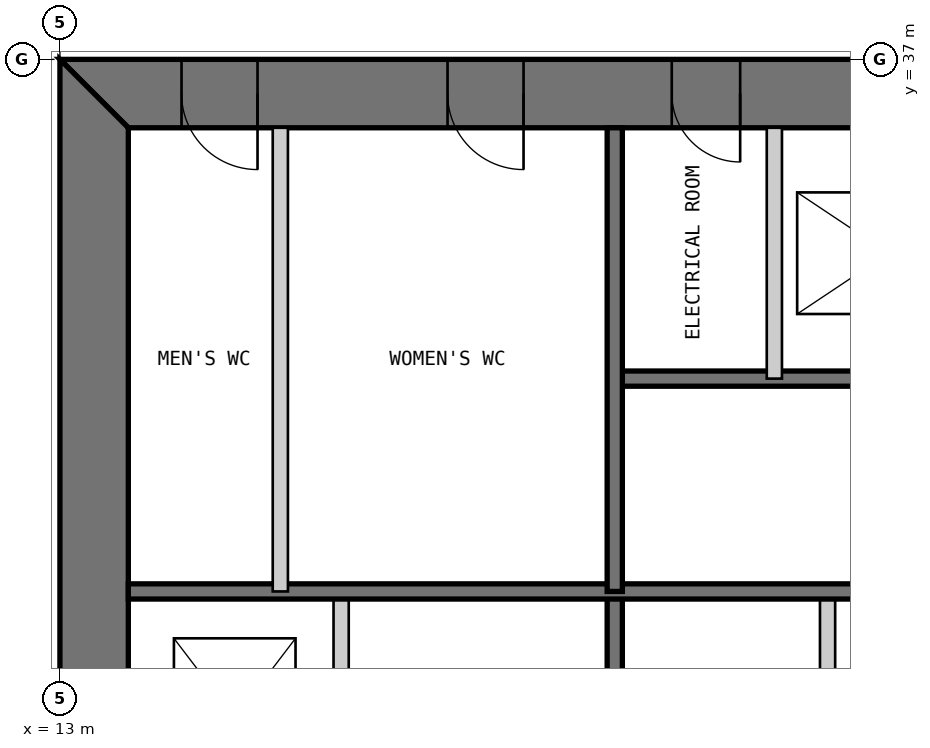
"""IFC4 building model, lengths in metres.
Left out: names, types, materials, properties, quantities, classifications, styles, units other than length and angle.
Written with IfcOpenShell. Run it as: python <this file> out.ifc"""

import sys

from ifc_helpers import new_model, si_unit, direction, frame, frame_2d, origin, place, context, subcontext, project, spatial, polyline, rectangle, outline, extrude, element, fill, save


model = new_model("IFC4")
c1 = context("Model", 3, precision=1e-05, world=origin(), true_north=direction((0.0, 1.0)))
c2 = subcontext(c1, "Body", "Model", "MODEL_VIEW")
j1 = project(units=[si_unit("LENGTHUNIT", "METRE"), si_unit("PLANEANGLEUNIT", "RADIAN")], contexts=[c1])
p1 = place(None, origin())
s1 = spatial("IfcSite", under=j1, at=p1, CompositionType="ELEMENT")
p2 = place(p1, origin())
s2 = spatial("IfcBuilding", under=s1, at=p2, CompositionType="ELEMENT")
p3 = place(p2, frame((0.0, 0.0, 83.0)))
s3 = spatial("IfcBuildingStorey", under=s2, at=p3, CompositionType="ELEMENT", Elevation=83.0)
p4 = place(p3, frame((37.0, 36.55, 0.0), z_axis=(0.0, 0.0, 1.0), x_axis=(-1.0, 0.0, 0.0)))
e1 = element("IfcWall", 1, at=p4, inside=s3, PredefinedType="SHEAR", context=c2, shape_type="SweptSolid", body=[
    extrude(outline(polyline([(0.0, -0.45), (24.0, -0.45), (23.1, 0.45), (0.9, 0.45), (0.0, -0.45)])), origin(), (0.0, 0.0, 1.0), 4.0),
])
p5 = place(p4, frame((4.9, 0.0, 0.0)))
e2 = element("IfcOpeningElement", 2, at=p5, cuts=e1, PredefinedType="OPENING", context=c2, shape_type="SweptSolid", body=[
    extrude(rectangle(XDim=1.0, YDim=2.2, at=frame_2d((0.5, 1.1))), frame((0.0, 0.46, 0.0), z_axis=(0.0, -1.0, 0.0), x_axis=(1.0, 0.0, 0.0)), (0.0, 0.0, 1.0), 0.92),
])
p6 = place(p4, frame((8.9, 0.0, 0.0)))
e3 = element("IfcOpeningElement", 3, at=p6, cuts=e1, PredefinedType="OPENING", context=c2, shape_type="SweptSolid", body=[
    extrude(rectangle(XDim=1.1, YDim=2.2, at=frame_2d((0.55, 1.1))), frame((0.0, 0.46, 0.0), z_axis=(0.0, -1.0, 0.0), x_axis=(1.0, 0.0, 0.0)), (0.0, 0.0, 1.0), 0.92),
])
p7 = place(p4, frame((15.05, 0.0, 0.0)))
e4 = element("IfcOpeningElement", 4, at=p7, cuts=e1, PredefinedType="OPENING", context=c2, shape_type="SweptSolid", body=[
    extrude(rectangle(XDim=0.9, YDim=2.2, at=frame_2d((0.45, 1.1))), frame((0.0, 0.46, 0.0), z_axis=(0.0, -1.0, 0.0), x_axis=(1.0, 0.0, 0.0)), (0.0, 0.0, 1.0), 0.92),
])
p8 = place(p4, frame((17.9, 0.0, 0.0)))
e5 = element("IfcOpeningElement", 5, at=p8, cuts=e1, PredefinedType="OPENING", context=c2, shape_type="SweptSolid", body=[
    extrude(rectangle(XDim=1.0, YDim=2.2, at=frame_2d((0.5, 1.1))), frame((0.0, 0.46, 0.0), z_axis=(0.0, -1.0, 0.0), x_axis=(1.0, 0.0, 0.0)), (0.0, 0.0, 1.0), 0.92),
])
p9 = place(p4, frame((21.4, 0.0, 0.0)))
e6 = element("IfcOpeningElement", 6, at=p9, cuts=e1, PredefinedType="OPENING", context=c2, shape_type="SweptSolid", body=[
    extrude(rectangle(XDim=1.0, YDim=2.2, at=frame_2d((0.5, 1.1))), frame((0.0, 0.46, 0.0), z_axis=(0.0, -1.0, 0.0), x_axis=(1.0, 0.0, 0.0)), (0.0, 0.0, 1.0), 0.92),
])
p10 = place(p3, frame((13.45, 36.1, 0.0), z_axis=(0.0, 0.0, 1.0), x_axis=(0.0, -1.0, 0.0)))
e7 = element("IfcWall", 7, at=p10, inside=s3, PredefinedType="SHEAR", context=c2, shape_type="SweptSolid", body=[
    extrude(outline(polyline([(-0.9, -0.45), (23.1, -0.45), (22.2, 0.45), (0.0, 0.45), (-0.9, -0.45)])), origin(), (0.0, 0.0, 1.0), 4.0),
])
p11 = place(p10, frame((20.2, 0.0, 0.0)))
e8 = element("IfcOpeningElement", 8, at=p11, cuts=e7, PredefinedType="OPENING", context=c2, shape_type="SweptSolid", body=[
    extrude(rectangle(XDim=1.0, YDim=2.2, at=frame_2d((0.5, 1.1))), frame((0.0, 0.46, 0.0), z_axis=(0.0, -1.0, 0.0), x_axis=(1.0, 0.0, 0.0)), (0.0, 0.0, 1.0), 0.92),
])
p12 = place(p10, frame((17.25, 0.0, 0.0)))
e9 = element("IfcOpeningElement", 9, at=p12, cuts=e7, PredefinedType="OPENING", context=c2, shape_type="SweptSolid", body=[
    extrude(rectangle(XDim=0.9, YDim=2.2, at=frame_2d((0.45, 1.1))), frame((0.0, 0.46, 0.0), z_axis=(0.0, -1.0, 0.0), x_axis=(1.0, 0.0, 0.0)), (0.0, 0.0, 1.0), 0.92),
])
p13 = place(p3, frame((16.7, 13.9, 0.0), z_axis=(0.0, 0.0, 1.0), x_axis=(0.0, 1.0, 0.0)))
e10 = element("IfcWall", 10, at=p13, inside=s3, PredefinedType="PARTITIONING", context=c2, shape_type="SweptSolid", body=[
    extrude(rectangle(XDim=16.1, YDim=0.2, at=frame_2d((8.05, 0.0))), origin(), (0.0, 0.0, 1.0), 3.8),
])
p14 = place(p13, frame((4.1, 0.0, 0.0)))
e11 = element("IfcOpeningElement", 11, at=p14, cuts=e10, PredefinedType="OPENING", context=c2, shape_type="SweptSolid", body=[
    extrude(rectangle(XDim=0.9, YDim=2.2, at=frame_2d((0.45, 1.1))), frame((0.0, 0.11, 0.0), z_axis=(0.0, -1.0, 0.0), x_axis=(1.0, 0.0, 0.0)), (0.0, 0.0, 1.0), 0.22),
])
p15 = place(p13, frame((7.217, 0.0, 0.0)))
e12 = element("IfcOpeningElement", 12, at=p15, cuts=e10, PredefinedType="OPENING", context=c2, shape_type="SweptSolid", body=[
    extrude(rectangle(XDim=1.1, YDim=2.2, at=frame_2d((0.55, 1.1))), frame((0.0, 0.11, 0.0), z_axis=(0.0, -1.0, 0.0), x_axis=(1.0, 0.0, 0.0)), (0.0, 0.0, 1.0), 0.22),
])
p16 = place(p13, frame((10.55, 0.0, 0.0)))
e13 = element("IfcOpeningElement", 13, at=p16, cuts=e10, PredefinedType="OPENING", context=c2, shape_type="SweptSolid", body=[
    extrude(rectangle(XDim=1.1, YDim=2.2, at=frame_2d((0.55, 1.1))), frame((0.0, 0.11, 0.0), z_axis=(0.0, -1.0, 0.0), x_axis=(1.0, 0.0, 0.0)), (0.0, 0.0, 1.0), 0.22),
])
p17 = place(p13, frame((13.883, 0.0, 0.0)))
e14 = element("IfcOpeningElement", 14, at=p17, cuts=e10, PredefinedType="OPENING", context=c2, shape_type="SweptSolid", body=[
    extrude(rectangle(XDim=1.1, YDim=2.2, at=frame_2d((0.55, 1.1))), frame((0.0, 0.11, 0.0), z_axis=(0.0, -1.0, 0.0), x_axis=(1.0, 0.0, 0.0)), (0.0, 0.0, 1.0), 0.22),
])
p18 = place(p3, frame((20.3, 13.9, 0.0), z_axis=(0.0, 0.0, 1.0), x_axis=(0.0, 1.0, 0.0)))
e15 = element("IfcWall", 15, at=p18, inside=s3, PredefinedType="SOLIDWALL", context=c2, shape_type="SweptSolid", body=[
    extrude(rectangle(XDim=16.1, YDim=0.2, at=frame_2d((8.05, 0.0))), origin(), (0.0, 0.0, 1.0), 3.8),
])
p19 = place(p3, frame((23.1, 20.0, 0.0), z_axis=(0.0, 0.0, 1.0), x_axis=(0.0, 1.0, 0.0)))
e16 = element("IfcWall", 16, at=p19, inside=s3, PredefinedType="PARTITIONING", context=c2, shape_type="SweptSolid", body=[
    extrude(rectangle(XDim=10.0, YDim=0.2, at=frame_2d((5.0, 0.0))), origin(), (0.0, 0.0, 1.0), 3.8),
])
p20 = place(p3, frame((29.7, 32.8, 0.0), z_axis=(0.0, 0.0, 1.0), x_axis=(-1.0, 0.0, 0.0)))
e17 = element("IfcWall", 17, at=p20, inside=s3, PredefinedType="SOLIDWALL", context=c2, shape_type="SweptSolid", body=[
    extrude(rectangle(XDim=9.4, YDim=0.2, at=frame_2d((4.7, 0.0))), origin(), (0.0, 0.0, 1.0), 3.8),
])
p21 = place(p20, frame((0.25, 0.0, 0.0)))
e18 = element("IfcOpeningElement", 18, at=p21, cuts=e17, PredefinedType="OPENING", context=c2, shape_type="SweptSolid", body=[
    extrude(rectangle(XDim=1.0, YDim=2.2, at=frame_2d((0.5, 1.1))), frame((0.0, 0.11, 0.0), z_axis=(0.0, -1.0, 0.0), x_axis=(1.0, 0.0, 0.0)), (0.0, 0.0, 1.0), 0.22),
])
p22 = place(p3, frame((29.7, 30.0, 0.0), z_axis=(0.0, 0.0, 1.0), x_axis=(-1.0, 0.0, 0.0)))
e19 = element("IfcWall", 19, at=p22, inside=s3, PredefinedType="SOLIDWALL", context=c2, shape_type="SweptSolid", body=[
    extrude(rectangle(XDim=15.8, YDim=0.2, at=frame_2d((7.9, 0.0))), origin(), (0.0, 0.0, 1.0), 3.8),
])
p23 = place(p3, frame((22.4, 36.1, 0.0), z_axis=(0.0, 0.0, 1.0), x_axis=(0.0, -1.0, 0.0)))
e20 = element("IfcWall", 20, at=p23, inside=s3, PredefinedType="PARTITIONING", context=c2, shape_type="SweptSolid", body=[
    extrude(rectangle(XDim=3.3, YDim=0.2, at=frame_2d((1.65, 0.0))), origin(), (0.0, 0.0, 1.0), 3.8),
])
p24 = place(p3, frame((20.3, 36.1, 0.0), z_axis=(0.0, 0.0, 1.0), x_axis=(0.0, -1.0, 0.0)))
e21 = element("IfcWall", 21, at=p24, inside=s3, PredefinedType="SOLIDWALL", context=c2, shape_type="SweptSolid", body=[
    extrude(rectangle(XDim=6.1, YDim=0.2, at=frame_2d((3.05, 0.0))), origin(), (0.0, 0.0, 1.0), 3.8),
])
p25 = place(p3, frame((15.9, 36.1, 0.0), z_axis=(0.0, 0.0, 1.0), x_axis=(0.0, -1.0, 0.0)))
e22 = element("IfcWall", 22, at=p25, inside=s3, PredefinedType="PARTITIONING", context=c2, shape_type="SweptSolid", body=[
    extrude(rectangle(XDim=6.1, YDim=0.2, at=frame_2d((3.05, 0.0))), origin(), (0.0, 0.0, 1.0), 3.8),
])
p26 = place(p7, origin())
e23 = element("IfcDoor", 23, at=p26, inside=s3, OperationType="SINGLE_SWING_LEFT", PredefinedType="DOOR", context=c2, shape_type="SweptSolid", body=[
    extrude(rectangle(XDim=0.9, YDim=2.2, at=frame_2d((0.45, 1.1))), frame((0.0, 0.025, 0.0), z_axis=(0.0, -1.0, 0.0), x_axis=(1.0, 0.0, 0.0)), (0.0, 0.0, 1.0), 0.05),
    extrude(outline(polyline([(0.0, 0.0), (0.04, 0.0), (0.04, 2.16), (0.86, 2.16), (0.86, 0.0), (0.9, 0.0), (0.9, 2.2), (0.0, 2.2), (0.0, 0.0)])), frame((0.0, 0.3, 0.0), z_axis=(0.0, -1.0, 0.0), x_axis=(1.0, 0.0, 0.0)), (0.0, 0.0, 1.0), 0.6),
])
fill(e4, e23)
p27 = place(p8, origin())
e24 = element("IfcDoor", 24, at=p27, inside=s3, OperationType="SINGLE_SWING_LEFT", PredefinedType="DOOR", context=c2, shape_type="SweptSolid", body=[
    extrude(rectangle(XDim=1.0, YDim=2.2, at=frame_2d((0.5, 1.1))), frame((0.0, 0.025, 0.0), z_axis=(0.0, -1.0, 0.0), x_axis=(1.0, 0.0, 0.0)), (0.0, 0.0, 1.0), 0.05),
    extrude(outline(polyline([(0.0, 0.0), (0.04, 0.0), (0.04, 2.16), (0.96, 2.16), (0.96, 0.0), (1.0, 0.0), (1.0, 2.2), (0.0, 2.2), (0.0, 0.0)])), frame((0.0, 0.3, 0.0), z_axis=(0.0, -1.0, 0.0), x_axis=(1.0, 0.0, 0.0)), (0.0, 0.0, 1.0), 0.6),
])
fill(e5, e24)
p28 = place(p9, origin())
e25 = element("IfcDoor", 25, at=p28, inside=s3, OperationType="SINGLE_SWING_LEFT", PredefinedType="DOOR", context=c2, shape_type="SweptSolid", body=[
    extrude(rectangle(XDim=1.0, YDim=2.2, at=frame_2d((0.5, 1.1))), frame((0.0, 0.025, 0.0), z_axis=(0.0, -1.0, 0.0), x_axis=(1.0, 0.0, 0.0)), (0.0, 0.0, 1.0), 0.05),
    extrude(outline(polyline([(0.0, 0.0), (0.04, 0.0), (0.04, 2.16), (0.96, 2.16), (0.96, 0.0), (1.0, 0.0), (1.0, 2.2), (0.0, 2.2), (0.0, 0.0)])), frame((0.0, 0.3, 0.0), z_axis=(0.0, -1.0, 0.0), x_axis=(1.0, 0.0, 0.0)), (0.0, 0.0, 1.0), 0.6),
])
fill(e6, e25)
save(model, sys.argv[1])
